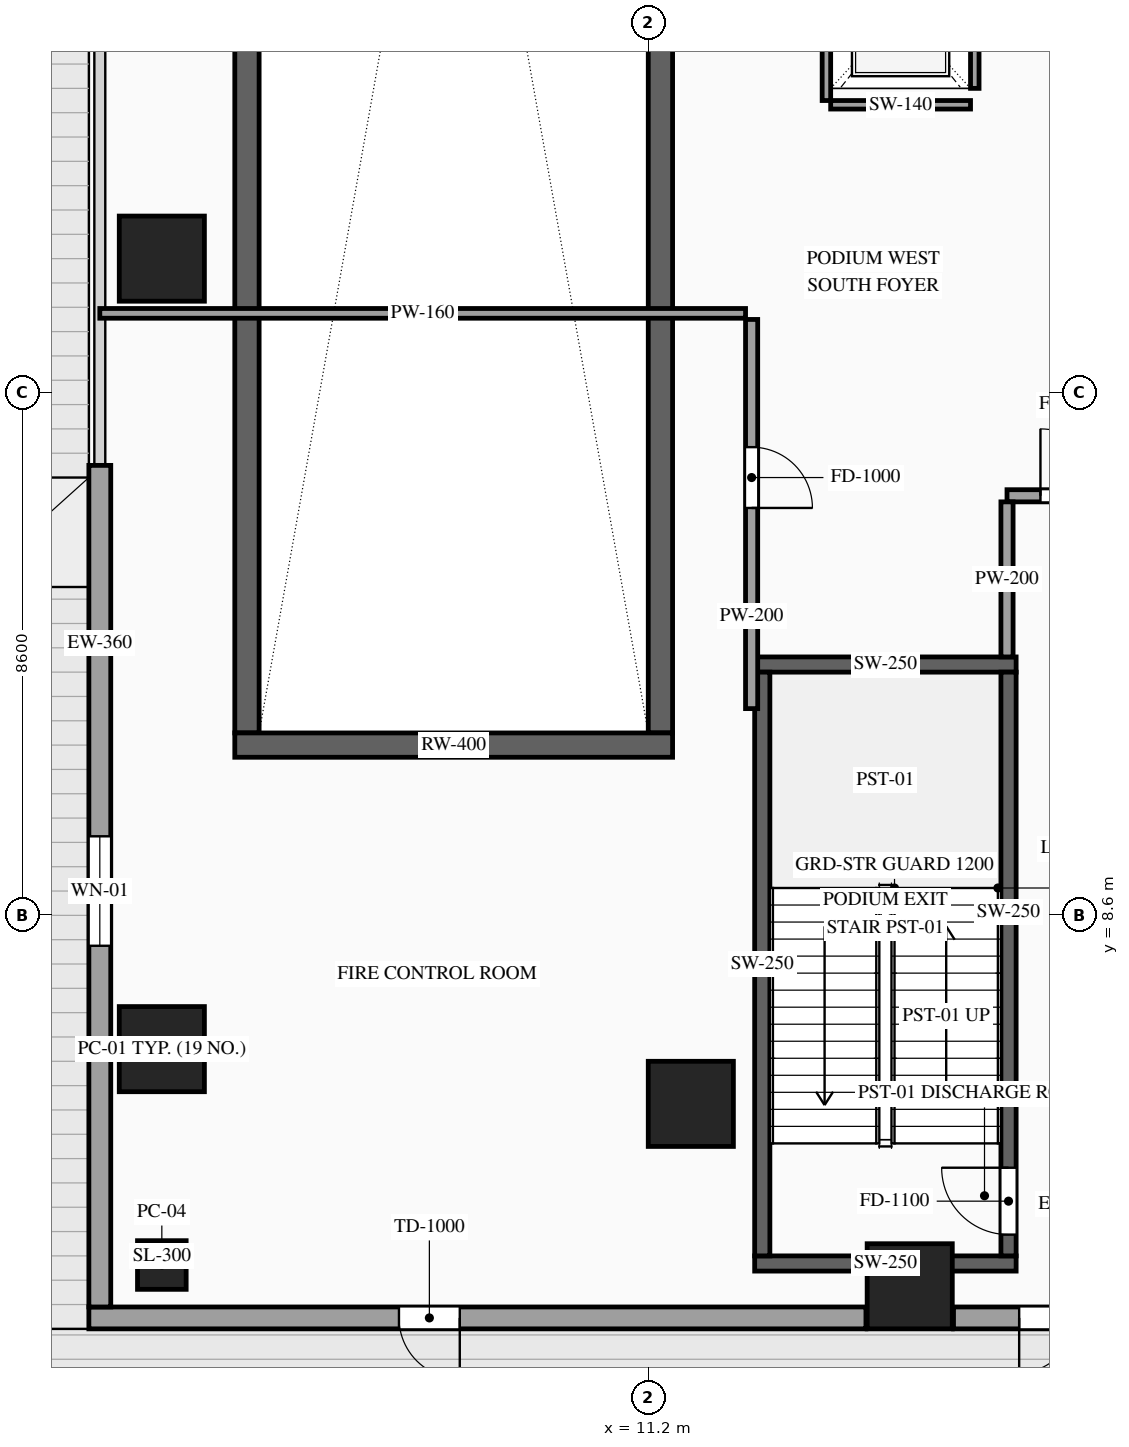
"""IFC4 building model, lengths in metres.
Left out: names, types, materials, properties, quantities, classifications, styles, units other than length and angle.
Written with IfcOpenShell. Run it as: python <this file> out.ifc"""

import sys

from ifc_helpers import new_model, si_unit, direction, frame, frame_2d, origin, origin_2d, place, context, subcontext, project, spatial, rectangle, extrude, source, transform, mapped, element, fill, save


model = new_model("IFC4")
c1 = context("Model", 3, precision=1e-05, world=origin(), true_north=direction((0.0, 1.0)))
c2 = subcontext(c1, "Body", "Model", "MODEL_VIEW")
j1 = project(units=[si_unit("LENGTHUNIT", "METRE"), si_unit("PLANEANGLEUNIT", "RADIAN")], contexts=[c1])
p1 = place(None, origin())
s1 = spatial("IfcSite", under=j1, at=p1, CompositionType="ELEMENT")
p2 = place(p1, origin())
s2 = spatial("IfcBuilding", under=s1, at=p2, CompositionType="ELEMENT")
p3 = place(p2, origin())
s3 = spatial("IfcBuildingStorey", under=s2, at=p3, CompositionType="ELEMENT", Elevation=0.0)
m1 = source(origin(), c2, "Body", "SweptSolid", [
    extrude(rectangle(XDim=37.8, YDim=0.4, at=frame_2d((18.9, 0.0))), origin(), (0.0, 0.0, 1.0), 5.12),
])
for number, where, z_axis, x_axis in (
    (1, (4.6, 11.6, 0.0), (0.0, 0.0, 1.0), (0.0, 1.0, 0.0)),
    (2, (11.4, 11.6, 0.0), (0.0, 0.0, 1.0), (0.0, 1.0, 0.0)),
):
    element("IfcWall", number, at=place(p3, frame(where, z_axis=z_axis, x_axis=x_axis)), inside=s3, PredefinedType="SOLIDWALL", context=c2, shape_type="MappedRepresentation", body=[
        mapped(m1, transform((0.0, 0.0, 0.0), scale=1.0)),
    ])
m2 = source(origin(), c2, "Body", "SweptSolid", [
    extrude(rectangle(XDim=7.2, YDim=0.4, at=frame_2d((3.6, 0.0))), origin(), (0.0, 0.0, 1.0), 5.12),
])
p4 = place(p3, frame((4.4, 11.4, 0.0), z_axis=(0.0, 0.0, 1.0), x_axis=(1.0, 0.0, 0.0)))
e3 = element("IfcWall", 3, at=p4, inside=s3, PredefinedType="SOLIDWALL", context=c2, shape_type="MappedRepresentation", body=[
    mapped(m2, transform((0.0, 0.0, 0.0), scale=1.0)),
])
m3 = source(origin(), c2, "Body", "SweptSolid", [
    extrude(rectangle(XDim=0.8, YDim=0.8, at=origin_2d()), origin(), (0.0, 0.0, 1.0), 5.4),
])
p5 = place(p3, frame((3.2, 2.85, 0.0), z_axis=(0.0, 0.0, 1.0), x_axis=(1.0, 0.0, 0.0)))
e4 = element("IfcColumn", 4, at=p5, inside=s3, PredefinedType="COLUMN", context=c2, shape_type="MappedRepresentation", body=[
    mapped(m3, transform((0.0, 0.0, 0.0), scale=1.0)),
])
m4 = source(origin(), c2, "Body", "SweptSolid", [
    extrude(rectangle(XDim=1.4, YDim=1.4, at=origin_2d()), origin(), (0.0, 0.0, 1.0), 5.4),
])
for number, where, z_axis, x_axis in (
    (5, (3.2, 6.4, 0.0), (0.0, 0.0, 1.0), (1.0, 0.0, 0.0)),
    (6, (3.2, 19.4, 0.0), (0.0, 0.0, 1.0), (1.0, 0.0, 0.0)),
    (7, (11.9, 5.5, 0.0), (0.0, 0.0, 1.0), (1.0, 0.0, 0.0)),
    (8, (15.5, 2.5, 0.0), (0.0, 0.0, 1.0), (1.0, 0.0, 0.0)),
):
    element("IfcColumn", number, at=place(p3, frame(where, z_axis=z_axis, x_axis=x_axis)), inside=s3, PredefinedType="COLUMN", context=c2, shape_type="MappedRepresentation", body=[
        mapped(m4, transform((0.0, 0.0, 0.0), scale=1.0)),
    ])
p6 = place(p3, frame((14.78, 1.98, 0.0), z_axis=(0.0, 0.0, 1.0), x_axis=(-1.0, 0.0, 0.0)))
e9 = element("IfcWall", 9, at=p6, inside=s3, PredefinedType="SOLIDWALL", context=c2, shape_type="SweptSolid", body=[
    extrude(rectangle(XDim=12.78, YDim=0.36, at=frame_2d((6.39, 0.0))), origin(), (0.0, 0.0, 1.0), 5.12),
])
p7 = place(p6, frame((6.68, 0.0, 0.0)))
e10 = element("IfcOpeningElement", 10, at=p7, cuts=e9, PredefinedType="OPENING", context=c2, shape_type="SweptSolid", body=[
    extrude(rectangle(XDim=1.0, YDim=2.2, at=frame_2d((0.5, 1.1))), frame((0.0, 0.195, 0.0), z_axis=(0.0, -1.0, 0.0), x_axis=(1.0, 0.0, 0.0)), (0.0, 0.0, 1.0), 0.39),
])
p8 = place(p3, frame((20.2, 1.98, 0.0), z_axis=(0.0, 0.0, 1.0), x_axis=(-1.0, 0.0, 0.0)))
e11 = element("IfcWall", 11, at=p8, inside=s3, PredefinedType="SOLIDWALL", context=c2, shape_type="SweptSolid", body=[
    extrude(rectangle(XDim=3.98, YDim=0.36, at=frame_2d((1.99, 0.0))), origin(), (0.0, 0.0, 1.0), 5.12),
])
p9 = place(p8, frame((1.1, 0.0, 0.0)))
e12 = element("IfcOpeningElement", 12, at=p9, cuts=e11, PredefinedType="OPENING", context=c2, shape_type="SweptSolid", body=[
    extrude(rectangle(XDim=1.8, YDim=2.4, at=frame_2d((0.9, 1.2))), frame((0.0, 0.195, 0.0), z_axis=(0.0, -1.0, 0.0), x_axis=(1.0, 0.0, 0.0)), (0.0, 0.0, 1.0), 0.39),
])
p10 = place(p3, frame((2.18, 2.16, 0.0), z_axis=(0.0, 0.0, 1.0), x_axis=(0.0, 1.0, 0.0)))
e13 = element("IfcWall", 13, at=p10, inside=s3, PredefinedType="SOLIDWALL", context=c2, shape_type="SweptSolid", body=[
    extrude(rectangle(XDim=13.84, YDim=0.36, at=frame_2d((6.92, 0.0))), origin(), (0.0, 0.0, 1.0), 5.12),
])
p11 = place(p10, frame((5.94, 0.0, 0.9)))
e14 = element("IfcOpeningElement", 14, at=p11, cuts=e13, PredefinedType="OPENING", context=c2, shape_type="SweptSolid", body=[
    extrude(rectangle(XDim=1.8, YDim=2.2, at=frame_2d((0.9, 1.1))), frame((0.0, 0.195, 0.0), z_axis=(0.0, -1.0, 0.0), x_axis=(1.0, 0.0, 0.0)), (0.0, 0.0, 1.0), 0.39),
])
p12 = place(p3, frame((16.57, 22.2, 0.0), z_axis=(0.0, 0.0, 1.0), x_axis=(0.0, 1.0, 0.0)))
e15 = element("IfcWall", 15, at=p12, inside=s3, PredefinedType="SOLIDWALL", context=c2, shape_type="SweptSolid", body=[
    extrude(rectangle(XDim=2.5, YDim=0.14, at=frame_2d((1.25, 0.0))), origin(), (0.0, 0.0, 1.0), 5.12),
])
p13 = place(p12, frame((0.7, 0.0, 0.0)))
e16 = element("IfcOpeningElement", 16, at=p13, cuts=e15, PredefinedType="OPENING", context=c2, shape_type="SweptSolid", body=[
    extrude(rectangle(XDim=1.1, YDim=2.2, at=frame_2d((0.55, 1.1))), frame((0.0, 0.085, 0.0), z_axis=(0.0, -1.0, 0.0), x_axis=(1.0, 0.0, 0.0)), (0.0, 0.0, 1.0), 0.17),
])
m5 = source(origin(), c2, "Body", "SweptSolid", [
    extrude(rectangle(XDim=5.8, YDim=0.14, at=frame_2d((2.9, 0.0))), origin(), (0.0, 0.0, 1.0), 5.12),
])
p14 = place(p3, frame((14.13, 22.0, 0.0), z_axis=(0.0, 0.0, 1.0), x_axis=(0.0, 1.0, 0.0)))
e17 = element("IfcWall", 17, at=p14, inside=s3, PredefinedType="SOLIDWALL", context=c2, shape_type="MappedRepresentation", body=[
    mapped(m5, transform((0.0, 0.0, 0.0), scale=1.0)),
])
m6 = source(origin(), c2, "Body", "SweptSolid", [
    extrude(rectangle(XDim=2.3, YDim=0.14, at=frame_2d((1.15, 0.0))), origin(), (0.0, 0.0, 1.0), 5.12),
])
p15 = place(p3, frame((14.2, 21.93, 0.0), z_axis=(0.0, 0.0, 1.0), x_axis=(1.0, 0.0, 0.0)))
e18 = element("IfcWall", 18, at=p15, inside=s3, PredefinedType="SOLIDWALL", context=c2, shape_type="MappedRepresentation", body=[
    mapped(m6, transform((0.0, 0.0, 0.0), scale=1.0)),
])
m7 = source(origin(), c2, "Body", "SweptSolid", [
    extrude(rectangle(XDim=4.3, YDim=0.25, at=frame_2d((2.15, 0.0))), origin(), (0.0, 0.0, 1.0), 5.12),
])
for number, where, z_axis, x_axis in (
    (19, (12.95, 2.875, 0.0), (0.0, 0.0, 1.0), (1.0, 0.0, 0.0)),
    (20, (12.95, 12.725, 0.0), (0.0, 0.0, 1.0), (1.0, 0.0, 0.0)),
):
    element("IfcWall", number, at=place(p3, frame(where, z_axis=z_axis, x_axis=x_axis)), inside=s3, PredefinedType="SOLIDWALL", context=c2, shape_type="MappedRepresentation", body=[
        mapped(m7, transform((0.0, 0.0, 0.0), scale=1.0)),
    ])
m8 = source(origin(), c2, "Body", "SweptSolid", [
    extrude(rectangle(XDim=9.6, YDim=0.25, at=frame_2d((4.8, 0.0))), origin(), (0.0, 0.0, 1.0), 5.12),
])
p16 = place(p3, frame((13.075, 3.0, 0.0), z_axis=(0.0, 0.0, 1.0), x_axis=(0.0, 1.0, 0.0)))
e21 = element("IfcWall", 21, at=p16, inside=s3, PredefinedType="SOLIDWALL", context=c2, shape_type="MappedRepresentation", body=[
    mapped(m8, transform((0.0, 0.0, 0.0), scale=1.0)),
])
p17 = place(p3, frame((17.125, 3.0, 0.0), z_axis=(0.0, 0.0, 1.0), x_axis=(0.0, 1.0, 0.0)))
e22 = element("IfcWall", 22, at=p17, inside=s3, PredefinedType="SOLIDWALL", context=c2, shape_type="SweptSolid", body=[
    extrude(rectangle(XDim=9.6, YDim=0.25, at=frame_2d((4.8, 0.0))), origin(), (0.0, 0.0, 1.0), 5.12),
])
p18 = place(p17, frame((0.35, 0.0, 0.0)))
e23 = element("IfcOpeningElement", 23, at=p18, cuts=e22, PredefinedType="OPENING", context=c2, shape_type="SweptSolid", body=[
    extrude(rectangle(XDim=1.1, YDim=2.2, at=frame_2d((0.55, 1.1))), frame((0.0, 0.14, 0.0), z_axis=(0.0, -1.0, 0.0), x_axis=(1.0, 0.0, 0.0)), (0.0, 0.0, 1.0), 0.28),
])
p19 = place(p3, frame((17.1, 15.5, 0.0), z_axis=(0.0, 0.0, 1.0), x_axis=(1.0, 0.0, 0.0)))
e24 = element("IfcWall", 24, at=p19, inside=s3, PredefinedType="PARTITIONING", context=c2, shape_type="SweptSolid", body=[
    extrude(rectangle(XDim=2.25, YDim=0.2, at=frame_2d((1.125, 0.0))), origin(), (0.0, 0.0, 1.0), 5.12),
])
p20 = place(p19, frame((0.55, 0.0, 0.0)))
e25 = element("IfcOpeningElement", 25, at=p20, cuts=e24, PredefinedType="OPENING", context=c2, shape_type="SweptSolid", body=[
    extrude(rectangle(XDim=1.1, YDim=2.2, at=frame_2d((0.55, 1.1))), frame((0.0, 0.115, 0.0), z_axis=(0.0, -1.0, 0.0), x_axis=(1.0, 0.0, 0.0)), (0.0, 0.0, 1.0), 0.23),
])
m9 = source(origin(), c2, "Body", "SweptSolid", [
    extrude(rectangle(XDim=2.55, YDim=0.2, at=frame_2d((1.275, 0.0))), origin(), (0.0, 0.0, 1.0), 5.12),
])
p21 = place(p3, frame((17.1, 12.85, 0.0), z_axis=(0.0, 0.0, 1.0), x_axis=(0.0, 1.0, 0.0)))
e26 = element("IfcWall", 26, at=p21, inside=s3, PredefinedType="PARTITIONING", context=c2, shape_type="MappedRepresentation", body=[
    mapped(m9, transform((0.0, 0.0, 0.0), scale=1.0)),
])
p22 = place(p3, frame((12.9, 18.4, 0.0), z_axis=(0.0, 0.0, 1.0), x_axis=(0.0, -1.0, 0.0)))
e27 = element("IfcWall", 27, at=p22, inside=s3, PredefinedType="PARTITIONING", context=c2, shape_type="SweptSolid", body=[
    extrude(rectangle(XDim=6.4, YDim=0.2, at=frame_2d((3.2, 0.0))), origin(), (0.0, 0.0, 1.0), 5.12),
])
p23 = place(p22, frame((2.1, 0.0, 0.0)))
e28 = element("IfcOpeningElement", 28, at=p23, cuts=e27, PredefinedType="OPENING", context=c2, shape_type="SweptSolid", body=[
    extrude(rectangle(XDim=1.0, YDim=2.2, at=frame_2d((0.5, 1.1))), frame((0.0, 0.115, 0.0), z_axis=(0.0, -1.0, 0.0), x_axis=(1.0, 0.0, 0.0)), (0.0, 0.0, 1.0), 0.23),
])
m10 = source(origin(), c2, "Body", "SweptSolid", [
    extrude(rectangle(XDim=10.62, YDim=0.16, at=frame_2d((5.31, 0.0))), origin(), (0.0, 0.0, 1.0), 5.12),
])
p24 = place(p3, frame((2.18, 18.5, 0.0), z_axis=(0.0, 0.0, 1.0), x_axis=(1.0, 0.0, 0.0)))
e29 = element("IfcWall", 29, at=p24, inside=s3, PredefinedType="PARTITIONING", context=c2, shape_type="MappedRepresentation", body=[
    mapped(m10, transform((0.0, 0.0, 0.0), scale=1.0)),
])
m11 = source(origin(), c2, "Body", "SweptSolid", [
    extrude(rectangle(XDim=1.0, YDim=2.2, at=frame_2d((0.5, 1.1))), frame((0.0, 0.025, 0.0), z_axis=(0.0, -1.0, 0.0), x_axis=(1.0, 0.0, 0.0)), (0.0, 0.0, 1.0), 0.05),
])
p25 = place(p7, origin())
e30 = element("IfcDoor", 30, at=p25, inside=s3, OperationType="SINGLE_SWING_LEFT", PredefinedType="DOOR", context=c2, shape_type="MappedRepresentation", body=[
    mapped(m11, transform((0.0, 0.0, 0.0), scale=1.0)),
])
fill(e10, e30)
m12 = source(origin(), c2, "Body", "SweptSolid", [
    extrude(rectangle(XDim=1.8, YDim=2.4, at=frame_2d((0.9, 1.2))), frame((0.0, 0.025, 0.0), z_axis=(0.0, -1.0, 0.0), x_axis=(1.0, 0.0, 0.0)), (0.0, 0.0, 1.0), 0.05),
])
p26 = place(p9, origin())
e31 = element("IfcDoor", 31, at=p26, inside=s3, OperationType="DOUBLE_DOOR_SINGLE_SWING", PredefinedType="DOOR", context=c2, shape_type="MappedRepresentation", body=[
    mapped(m12, transform((0.0, 0.0, 0.0), scale=1.0)),
])
fill(e12, e31)
m13 = source(origin(), c2, "Body", "SweptSolid", [
    extrude(rectangle(XDim=1.8, YDim=2.2, at=frame_2d((0.9, 1.1))), frame((0.0, 0.03, 0.0), z_axis=(0.0, -1.0, 0.0), x_axis=(1.0, 0.0, 0.0)), (0.0, 0.0, 1.0), 0.06),
])
p27 = place(p11, origin())
e32 = element("IfcWindow", 32, at=p27, inside=s3, PartitioningType="SINGLE_PANEL", PredefinedType="WINDOW", context=c2, shape_type="MappedRepresentation", body=[
    mapped(m13, transform((0.0, 0.0, 0.0), scale=1.0)),
])
fill(e14, e32)
m14 = source(origin(), c2, "Body", "SweptSolid", [
    extrude(rectangle(XDim=1.1, YDim=2.2, at=frame_2d((0.55, 1.1))), frame((0.0, 0.025, 0.0), z_axis=(0.0, -1.0, 0.0), x_axis=(1.0, 0.0, 0.0)), (0.0, 0.0, 1.0), 0.05),
])
p28 = place(p18, origin())
e33 = element("IfcDoor", 33, at=p28, inside=s3, OperationType="SINGLE_SWING_RIGHT", PredefinedType="DOOR", context=c2, shape_type="MappedRepresentation", body=[
    mapped(m14, transform((0.0, 0.0, 0.0), scale=1.0)),
])
fill(e23, e33)
p29 = place(p20, origin())
e34 = element("IfcDoor", 34, at=p29, inside=s3, OperationType="SINGLE_SWING_LEFT", PredefinedType="DOOR", context=c2, shape_type="MappedRepresentation", body=[
    mapped(m14, transform((0.0, 0.0, 0.0), scale=1.0)),
])
fill(e25, e34)
m15 = source(origin(), c2, "Body", "SweptSolid", [
    extrude(rectangle(XDim=1.0, YDim=2.2, at=frame_2d((0.5, 1.1))), frame((0.0, 0.025, 0.0), z_axis=(0.0, -1.0, 0.0), x_axis=(1.0, 0.0, 0.0)), (0.0, 0.0, 1.0), 0.05),
])
p30 = place(p23, origin())
e35 = element("IfcDoor", 35, at=p30, inside=s3, OperationType="SINGLE_SWING_RIGHT", PredefinedType="DOOR", context=c2, shape_type="MappedRepresentation", body=[
    mapped(m15, transform((0.0, 0.0, 0.0), scale=1.0)),
])
fill(e28, e35)
save(model, sys.argv[1])
